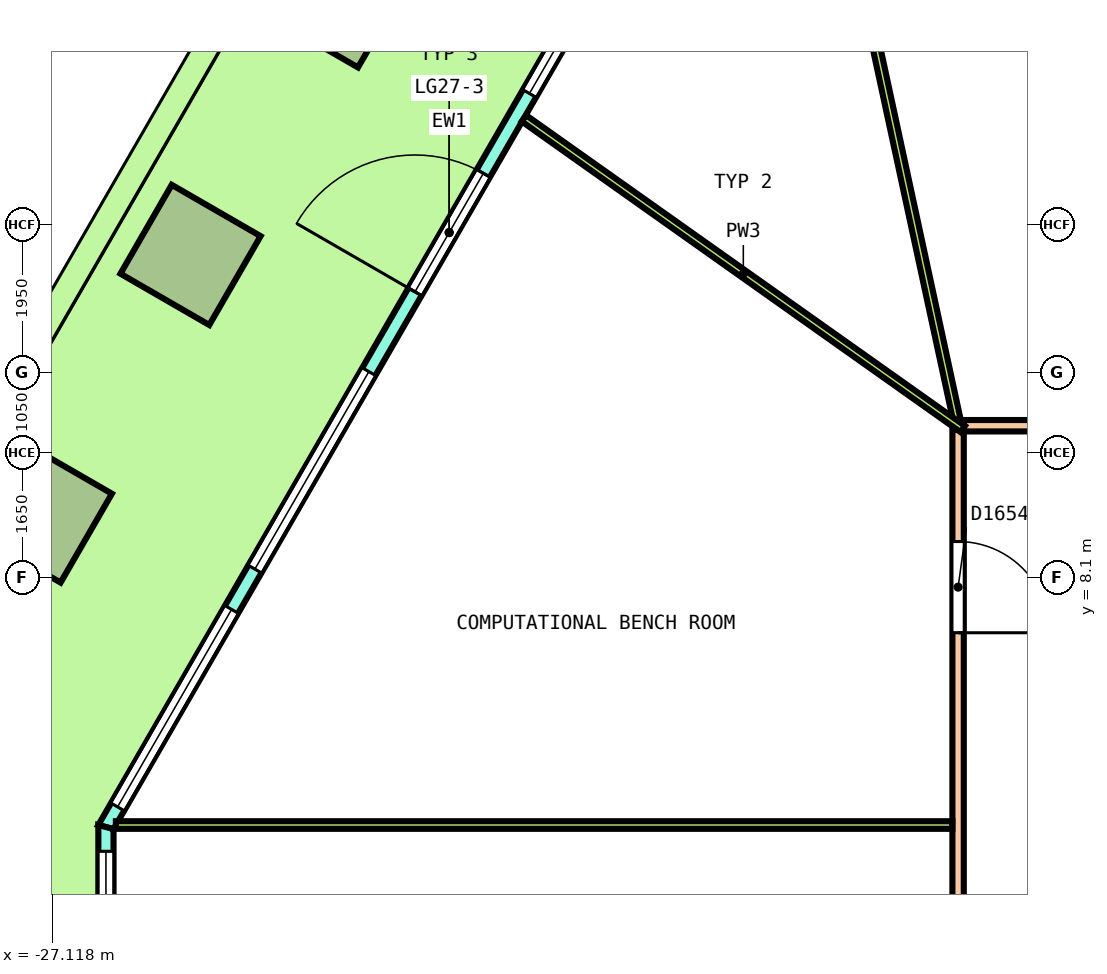
"""IFC4 building model, lengths in metres.
Left out: names, types, materials, properties, quantities, classifications, styles, units other than length and angle.
Written with IfcOpenShell. Run it as: python <this file> out.ifc"""

import sys

from ifc_helpers import new_model, si_unit, direction, frame, frame_2d, origin, origin_2d, place, context, subcontext, project, spatial, polyline, rectangle, outline, extrude, element, fill, save


model = new_model("IFC4")
c1 = context("Model", 3, precision=1e-05, world=origin(), true_north=direction((0.0, 1.0)))
c2 = subcontext(c1, "Body", "Model", "MODEL_VIEW")
j1 = project(units=[si_unit("LENGTHUNIT", "METRE"), si_unit("PLANEANGLEUNIT", "RADIAN")], contexts=[c1])
p1 = place(None, origin())
s1 = spatial("IfcSite", under=j1, at=p1, CompositionType="ELEMENT")
p2 = place(p1, origin())
s2 = spatial("IfcBuilding", under=s1, at=p2, CompositionType="ELEMENT")
p3 = place(p2, frame((0.0, 0.0, 126.4)))
s3 = spatial("IfcBuildingStorey", under=s2, at=p3, CompositionType="ELEMENT", Elevation=126.4)
for number, where, z_axis, x_axis in (
    (1, (-23.342, 15.736, 0.0), (0.0, 0.0, 1.0), (-0.5, -0.866, 0.0)),
    (2, (-25.299, 12.347, 0.0), (0.0, 0.0, 1.0), (-0.5, -0.866, 0.0)),
    (3, (-27.255, 8.959, 0.0), (0.0, 0.0, 1.0), (-0.5, -0.866, 0.0)),
):
    element("IfcColumn", number, at=place(p3, frame(where, z_axis=z_axis, x_axis=x_axis)), inside=s3, PredefinedType="COLUMN", context=c2, shape_type="SweptSolid", body=[
        extrude(rectangle(XDim=1.35, YDim=1.35, at=origin_2d()), origin(), (0.0, 0.0, 1.0), 4.05),
    ])
p4 = place(p3, frame((-17.38, 20.463, 0.0), z_axis=(0.0, 0.0, 1.0), x_axis=(-0.500000137386, -0.866025324465, 0.0)))
e4 = element("IfcWall", 4, at=p4, inside=s3, PredefinedType="SOLIDWALL", context=c2, shape_type="SweptSolid", body=[
    extrude(outline(polyline([(-0.027, -0.1), (0.979, -0.1), (1.986, -0.1), (2.992, -0.1), (3.999, -0.1), (5.005, -0.1), (6.012, -0.1), (7.018, -0.1), (8.025, -0.1), (9.031, -0.1), (10.038, -0.1), (11.044, -0.1), (12.051, -0.1), (13.057, -0.1), (14.063, -0.1), (15.07, -0.1), (16.076, -0.1), (17.083, -0.1), (18.089, -0.1), (18.036, 0.1), (17.035, 0.1), (16.035, 0.1), (15.034, 0.1), (14.034, 0.1), (13.033, 0.1), (12.033, 0.1), (11.032, 0.1), (10.032, 0.1), (9.031, 0.1), (8.031, 0.1), (7.03, 0.1), (6.03, 0.1), (5.029, 0.1), (4.029, 0.1), (3.028, 0.1), (2.028, 0.1), (1.027, 0.1), (0.027, 0.1), (-0.027, -0.1)])), origin(), (0.0, 0.0, 1.0), 4.1),
])
p5 = place(p4, frame((0.306, 0.0, 0.1)))
e5 = element("IfcOpeningElement", 5, at=p5, cuts=e4, PredefinedType="OPENING", context=c2, shape_type="SweptSolid", body=[
    extrude(rectangle(XDim=3.0, YDim=2.9, at=frame_2d((1.5, 1.45))), frame((0.0, 0.11, 0.0), z_axis=(0.0, -1.0, 0.0), x_axis=(1.0, 0.0, 0.0)), (0.0, 0.0, 1.0), 0.22),
])
p6 = place(p4, frame((3.919, 0.0, 0.1)))
e6 = element("IfcOpeningElement", 6, at=p6, cuts=e4, PredefinedType="OPENING", context=c2, shape_type="SweptSolid", body=[
    extrude(rectangle(XDim=3.0, YDim=2.9, at=frame_2d((1.5, 1.45))), frame((0.0, 0.11, 0.0), z_axis=(0.0, -1.0, 0.0), x_axis=(1.0, 0.0, 0.0)), (0.0, 0.0, 1.0), 0.22),
])
p7 = place(p4, frame((8.131, 0.0, 0.0)))
e7 = element("IfcOpeningElement", 7, at=p7, cuts=e4, PredefinedType="OPENING", context=c2, shape_type="SweptSolid", body=[
    extrude(rectangle(XDim=1.8, YDim=2.4, at=frame_2d((0.9, 1.2))), frame((0.0, 0.11, 0.0), z_axis=(0.0, -1.0, 0.0), x_axis=(1.0, 0.0, 0.0)), (0.0, 0.0, 1.0), 0.22),
])
p8 = place(p4, frame((8.131, 0.0, 2.55)))
e8 = element("IfcOpeningElement", 8, at=p8, cuts=e4, PredefinedType="OPENING", context=c2, shape_type="SweptSolid", body=[
    extrude(rectangle(XDim=1.8, YDim=0.45, at=frame_2d((0.9, 0.225))), frame((0.0, 0.11, 0.0), z_axis=(0.0, -1.0, 0.0), x_axis=(1.0, 0.0, 0.0)), (0.0, 0.0, 1.0), 0.22),
])
p9 = place(p4, frame((11.144, 0.0, 0.1)))
e9 = element("IfcOpeningElement", 9, at=p9, cuts=e4, PredefinedType="OPENING", context=c2, shape_type="SweptSolid", body=[
    extrude(rectangle(XDim=3.0, YDim=2.9, at=frame_2d((1.5, 1.45))), frame((0.0, 0.11, 0.0), z_axis=(0.0, -1.0, 0.0), x_axis=(1.0, 0.0, 0.0)), (0.0, 0.0, 1.0), 0.22),
])
p10 = place(p4, frame((14.756, 0.0, 0.1)))
e10 = element("IfcOpeningElement", 10, at=p10, cuts=e4, PredefinedType="OPENING", context=c2, shape_type="SweptSolid", body=[
    extrude(rectangle(XDim=3.0, YDim=2.9, at=frame_2d((1.5, 1.45))), frame((0.0, 0.11, 0.0), z_axis=(0.0, -1.0, 0.0), x_axis=(1.0, 0.0, 0.0)), (0.0, 0.0, 1.0), 0.22),
])
p11 = place(p3, frame((-26.411, 4.82, 0.0), z_axis=(0.0, 0.0, 1.0), x_axis=(0.0, -1.0, 0.0)))
e11 = element("IfcWall", 11, at=p11, inside=s3, PredefinedType="SOLIDWALL", context=c2, shape_type="SweptSolid", body=[
    extrude(outline(polyline([(-0.027, -0.1), (1.128, -0.1), (2.283, -0.1), (3.438, -0.1), (4.592, -0.1), (5.747, -0.1), (6.902, -0.1), (6.848, 0.1), (5.711, 0.1), (4.574, 0.1), (3.438, 0.1), (2.301, 0.1), (1.164, 0.1), (0.027, 0.1), (-0.027, -0.1)])), origin(), (0.0, 0.0, 1.0), 4.1),
])
p12 = place(p11, frame((0.319, 0.0, 0.1)))
e12 = element("IfcOpeningElement", 12, at=p12, cuts=e11, PredefinedType="OPENING", context=c2, shape_type="SweptSolid", body=[
    extrude(rectangle(XDim=2.8, YDim=2.9, at=frame_2d((1.4, 1.45))), frame((0.0, 0.11, 0.0), z_axis=(0.0, -1.0, 0.0), x_axis=(1.0, 0.0, 0.0)), (0.0, 0.0, 1.0), 0.22),
])
p13 = place(p11, frame((3.756, 0.0, 0.1)))
e13 = element("IfcOpeningElement", 13, at=p13, cuts=e11, PredefinedType="OPENING", context=c2, shape_type="SweptSolid", body=[
    extrude(rectangle(XDim=2.8, YDim=2.9, at=frame_2d((1.4, 1.45))), frame((0.0, 0.11, 0.0), z_axis=(0.0, -1.0, 0.0), x_axis=(1.0, 0.0, 0.0)), (0.0, 0.0, 1.0), 0.22),
])
p14 = place(p3, frame((-15.125, 10.1, 0.0), z_axis=(0.0, 0.0, 1.0), x_axis=(1.0, 0.0, 0.0)))
e14 = element("IfcWall", 14, at=p14, inside=s3, PredefinedType="PARTITIONING", context=c2, shape_type="SweptSolid", body=[
    extrude(rectangle(XDim=30.25, YDim=0.15, at=frame_2d((15.125, 0.0))), origin(), (0.0, 0.0, 1.0), 3.05),
])
p15 = place(p14, frame((16.895, 0.0, 0.0)))
e15 = element("IfcOpeningElement", 15, at=p15, cuts=e14, PredefinedType="OPENING", context=c2, shape_type="SweptSolid", body=[
    extrude(rectangle(XDim=1.2, YDim=2.1, at=frame_2d((0.6, 1.05))), frame((0.0, 0.085, 0.0), z_axis=(0.0, -1.0, 0.0), x_axis=(1.0, 0.0, 0.0)), (0.0, 0.0, 1.0), 0.17),
])
p16 = place(p14, frame((6.564, 0.0, 0.0)))
e16 = element("IfcOpeningElement", 16, at=p16, cuts=e14, PredefinedType="OPENING", context=c2, shape_type="SweptSolid", body=[
    extrude(rectangle(XDim=1.2, YDim=2.1, at=frame_2d((0.6, 1.05))), frame((0.0, 0.085, 0.0), z_axis=(0.0, -1.0, 0.0), x_axis=(1.0, 0.0, 0.0)), (0.0, 0.0, 1.0), 0.17),
])
p17 = place(p14, frame((1.476, 0.0, 0.0)))
e17 = element("IfcOpeningElement", 17, at=p17, cuts=e14, PredefinedType="OPENING", context=c2, shape_type="SweptSolid", body=[
    extrude(rectangle(XDim=1.2, YDim=2.1, at=frame_2d((0.6, 1.05))), frame((0.0, 0.085, 0.0), z_axis=(0.0, -1.0, 0.0), x_axis=(1.0, 0.0, 0.0)), (0.0, 0.0, 1.0), 0.17),
])
p18 = place(p3, frame((-15.2, 0.426, 0.0), z_axis=(0.0, 0.0, 1.0), x_axis=(0.0, 1.0, 0.0)))
e18 = element("IfcWall", 18, at=p18, inside=s3, PredefinedType="PARTITIONING", context=c2, shape_type="SweptSolid", body=[
    extrude(rectangle(XDim=9.624, YDim=0.15, at=frame_2d((4.812, 0.0))), origin(), (0.0, 0.0, 1.0), 3.05),
])
p19 = place(p18, frame((6.951, 0.0, 0.0)))
e19 = element("IfcOpeningElement", 19, at=p19, cuts=e18, PredefinedType="OPENING", context=c2, shape_type="SweptSolid", body=[
    extrude(rectangle(XDim=1.2, YDim=2.1, at=frame_2d((0.6, 1.05))), frame((0.0, 0.085, 0.0), z_axis=(0.0, -1.0, 0.0), x_axis=(1.0, 0.0, 0.0)), (0.0, 0.0, 1.0), 0.17),
])
p20 = place(p3, frame((-17.39, 20.245, 0.0), z_axis=(0.0, 0.0, 1.0), x_axis=(0.211012362952, -0.977483392535, 0.0)))
e20 = element("IfcWall", 20, at=p20, inside=s3, PredefinedType="PARTITIONING", context=c2, shape_type="SweptSolid", body=[
    extrude(rectangle(XDim=10.329, YDim=0.1, at=frame_2d((5.164, 0.0))), origin(), (0.0, 0.0, 1.0), 3.05),
])
p21 = place(p20, frame((3.387, 0.0, 0.0)))
e21 = element("IfcOpeningElement", 21, at=p21, cuts=e20, PredefinedType="OPENING", context=c2, shape_type="SweptSolid", body=[
    extrude(rectangle(XDim=1.0, YDim=2.1, at=frame_2d((0.5, 1.05))), frame((0.0, 0.06, 0.0), z_axis=(0.0, -1.0, 0.0), x_axis=(1.0, 0.0, 0.0)), (0.0, 0.0, 1.0), 0.12),
])
p22 = place(p3, frame((-20.912, 14.144, 0.0), z_axis=(0.0, 0.0, 1.0), x_axis=(0.816149265307, -0.577841134516, 0.0)))
e22 = element("IfcWall", 22, at=p22, inside=s3, PredefinedType="PARTITIONING", context=c2, shape_type="SweptSolid", body=[
    extrude(rectangle(XDim=7.074, YDim=0.1, at=frame_2d((3.537, 0.0))), origin(), (0.0, 0.0, 1.0), 3.05),
])
p23 = place(p3, frame((-26.28, 4.847, 0.0), z_axis=(0.0, 0.0, 1.0), x_axis=(1.0, 0.0, 0.0)))
e23 = element("IfcWall", 23, at=p23, inside=s3, PredefinedType="PARTITIONING", context=c2, shape_type="SweptSolid", body=[
    extrude(rectangle(XDim=11.005, YDim=0.1, at=frame_2d((5.503, 0.0))), origin(), (0.0, 0.0, 1.0), 3.05),
])
p24 = place(p6, origin())
e24 = element("IfcWindow", 24, at=p24, inside=s3, PartitioningType="SINGLE_PANEL", PredefinedType="WINDOW", context=c2, shape_type="SweptSolid", body=[
    extrude(rectangle(XDim=3.0, YDim=2.9, at=frame_2d((1.5, 1.45))), frame((0.0, 0.03, 0.0), z_axis=(0.0, -1.0, 0.0), x_axis=(1.0, 0.0, 0.0)), (0.0, 0.0, 1.0), 0.06),
])
fill(e6, e24)
p25 = place(p7, origin())
e25 = element("IfcDoor", 25, at=p25, inside=s3, OperationType="DOUBLE_DOOR_SINGLE_SWING", PredefinedType="DOOR", context=c2, shape_type="SweptSolid", body=[
    extrude(rectangle(XDim=1.8, YDim=2.4, at=frame_2d((0.9, 1.2))), frame((0.0, 0.025, 0.0), z_axis=(0.0, -1.0, 0.0), x_axis=(1.0, 0.0, 0.0)), (0.0, 0.0, 1.0), 0.05),
])
fill(e7, e25)
p26 = place(p8, origin())
e26 = element("IfcWindow", 26, at=p26, inside=s3, PartitioningType="SINGLE_PANEL", PredefinedType="WINDOW", context=c2, shape_type="SweptSolid", body=[
    extrude(rectangle(XDim=1.8, YDim=0.45, at=frame_2d((0.9, 0.225))), frame((0.0, 0.03, 0.0), z_axis=(0.0, -1.0, 0.0), x_axis=(1.0, 0.0, 0.0)), (0.0, 0.0, 1.0), 0.06),
])
fill(e8, e26)
p27 = place(p9, origin())
e27 = element("IfcWindow", 27, at=p27, inside=s3, PartitioningType="SINGLE_PANEL", PredefinedType="WINDOW", context=c2, shape_type="SweptSolid", body=[
    extrude(rectangle(XDim=3.0, YDim=2.9, at=frame_2d((1.5, 1.45))), frame((0.0, 0.03, 0.0), z_axis=(0.0, -1.0, 0.0), x_axis=(1.0, 0.0, 0.0)), (0.0, 0.0, 1.0), 0.06),
])
fill(e9, e27)
p28 = place(p10, origin())
e28 = element("IfcWindow", 28, at=p28, inside=s3, PartitioningType="SINGLE_PANEL", PredefinedType="WINDOW", context=c2, shape_type="SweptSolid", body=[
    extrude(rectangle(XDim=3.0, YDim=2.9, at=frame_2d((1.5, 1.45))), frame((0.0, 0.03, 0.0), z_axis=(0.0, -1.0, 0.0), x_axis=(1.0, 0.0, 0.0)), (0.0, 0.0, 1.0), 0.06),
])
fill(e10, e28)
p29 = place(p12, origin())
e29 = element("IfcWindow", 29, at=p29, inside=s3, PartitioningType="SINGLE_PANEL", PredefinedType="WINDOW", context=c2, shape_type="SweptSolid", body=[
    extrude(rectangle(XDim=2.8, YDim=2.9, at=frame_2d((1.4, 1.45))), frame((0.0, 0.03, 0.0), z_axis=(0.0, -1.0, 0.0), x_axis=(1.0, 0.0, 0.0)), (0.0, 0.0, 1.0), 0.06),
])
fill(e12, e29)
p30 = place(p19, origin())
e30 = element("IfcDoor", 30, at=p30, inside=s3, OperationType="DOUBLE_DOOR_SINGLE_SWING", PredefinedType="DOOR", context=c2, shape_type="SweptSolid", body=[
    extrude(rectangle(XDim=1.2, YDim=2.1, at=frame_2d((0.6, 1.05))), frame((0.0, 0.025, 0.0), z_axis=(0.0, -1.0, 0.0), x_axis=(1.0, 0.0, 0.0)), (0.0, 0.0, 1.0), 0.05),
])
fill(e19, e30)
save(model, sys.argv[1])
